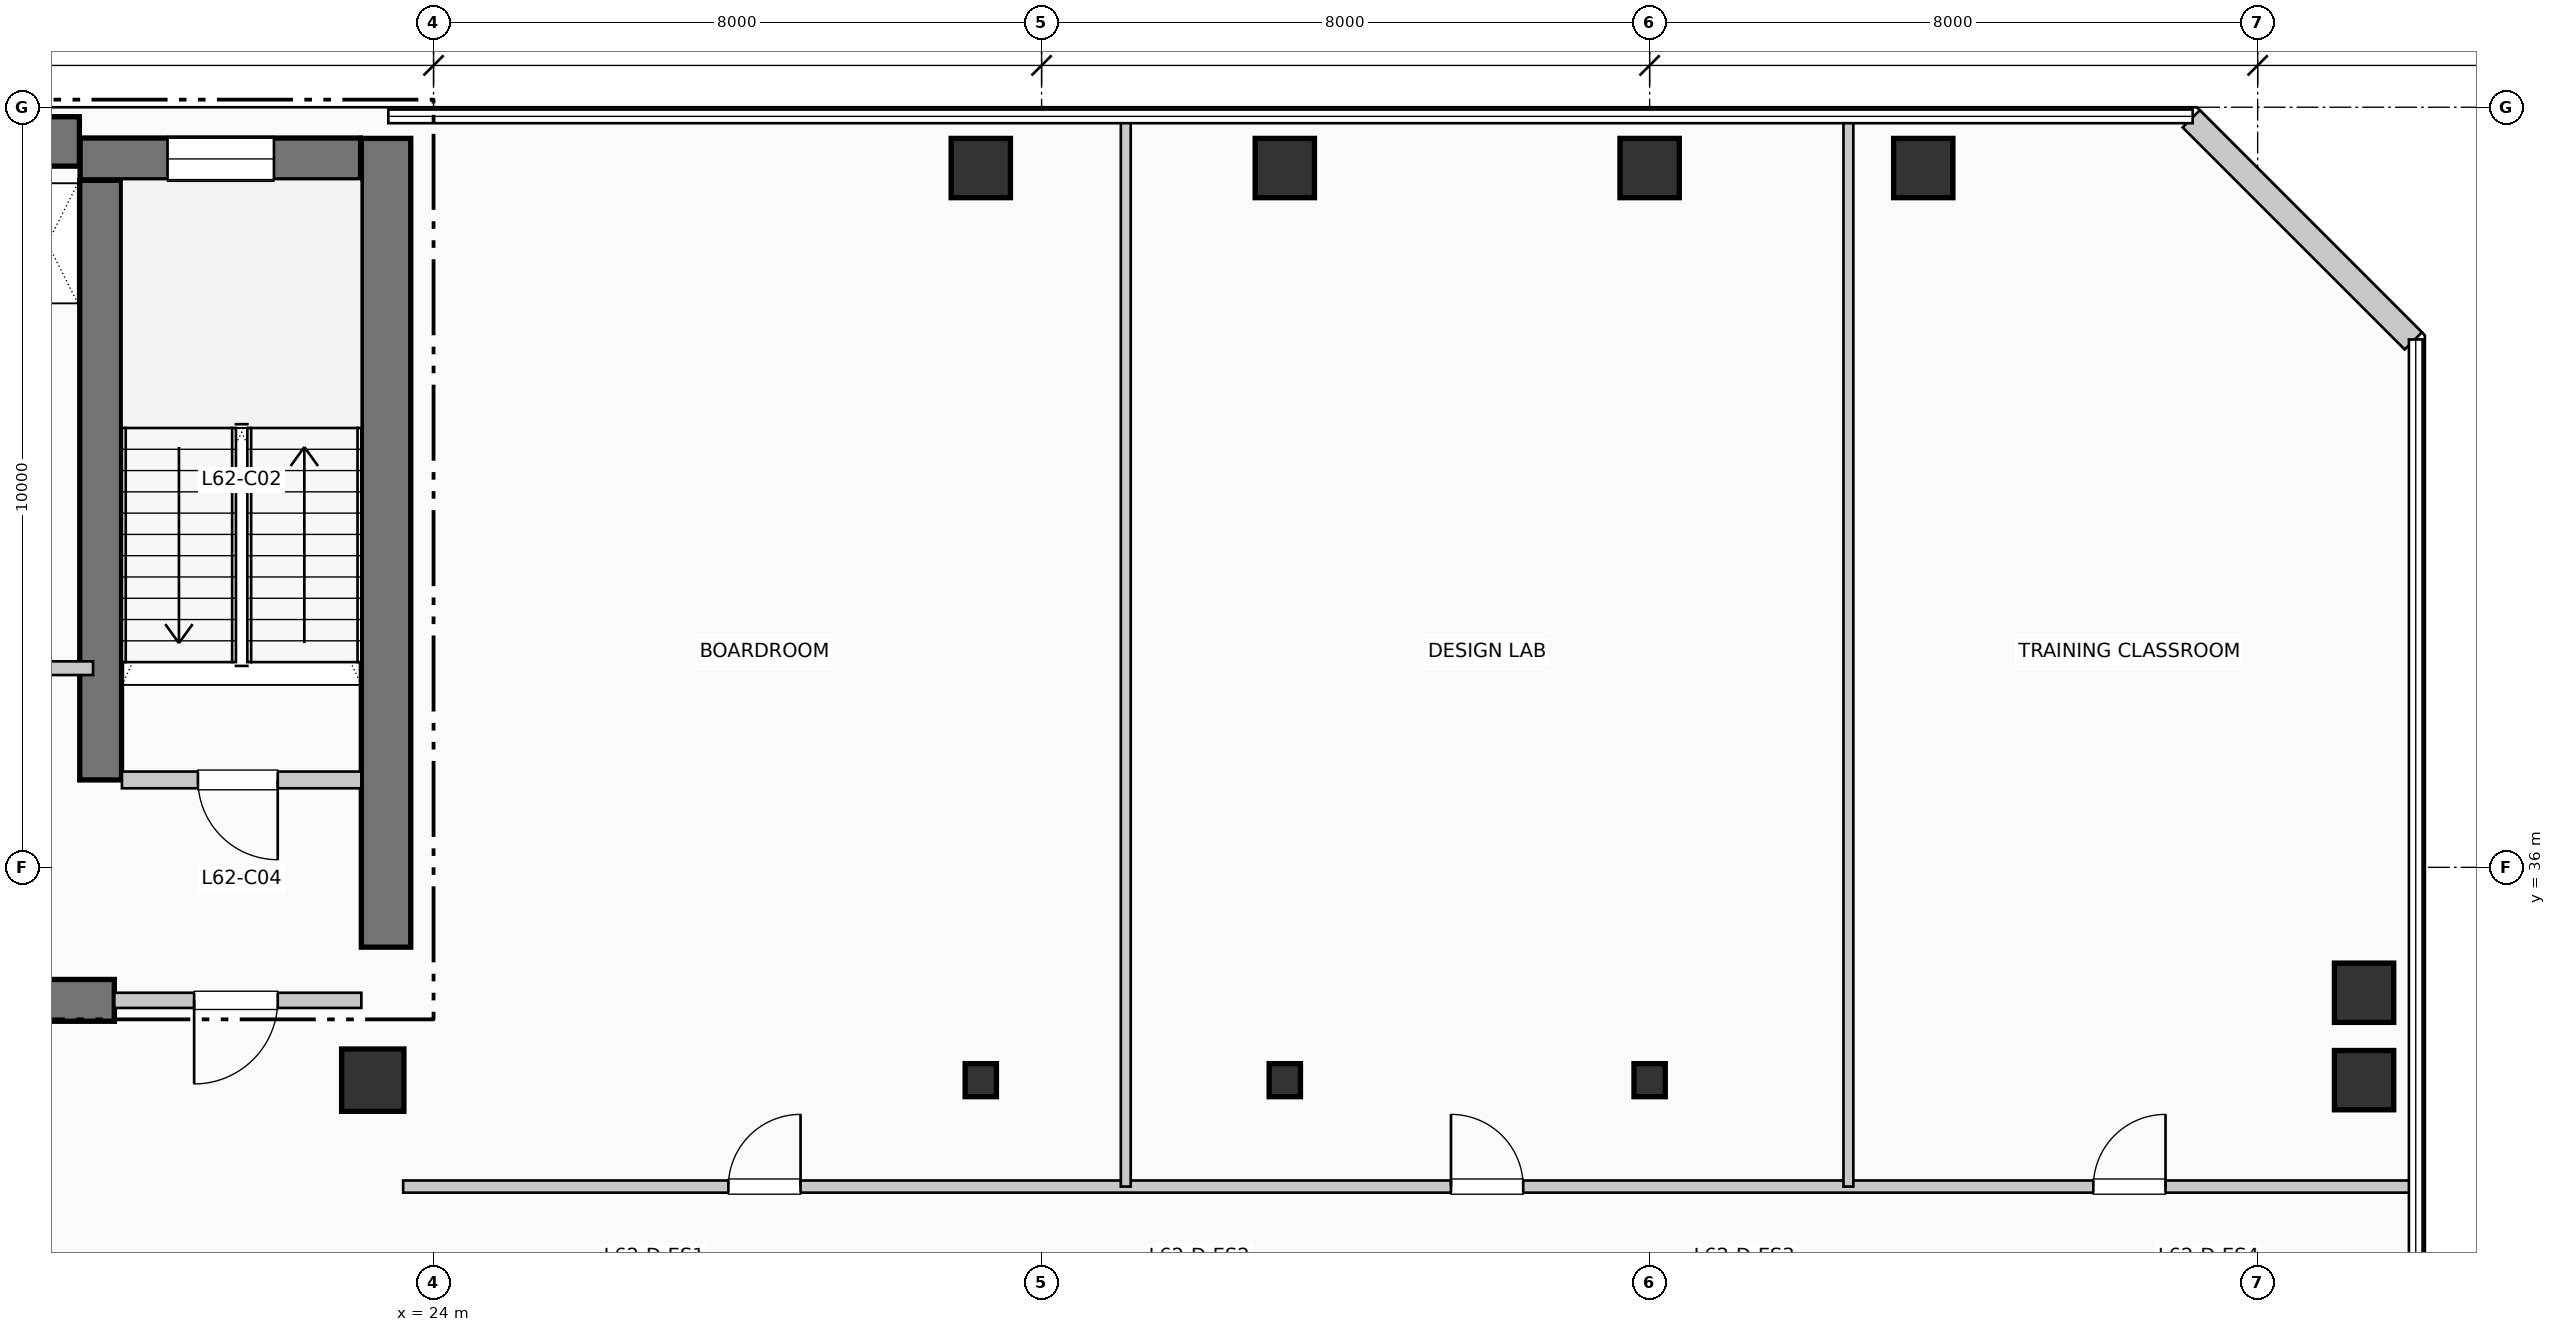
"""IFC4 building model, lengths in metres.
Left out: names, types, materials, properties, quantities, classifications, styles, units other than length and angle.
Written with IfcOpenShell. Run it as: python <this file> out.ifc"""

import sys

from ifc_helpers import new_model, si_unit, direction, frame, frame_2d, origin, origin_2d, place, context, subcontext, project, spatial, rectangle, i_section, extrude, element, fill, save


model = new_model("IFC4")
c1 = context("Model", 3, precision=1e-05, world=origin(), true_north=direction((0.0, 1.0)))
c2 = subcontext(c1, "Body", "Model", "MODEL_VIEW")
j1 = project(units=[si_unit("LENGTHUNIT", "METRE"), si_unit("PLANEANGLEUNIT", "RADIAN")], contexts=[c1])
p1 = place(None, origin())
s1 = spatial("IfcSite", under=j1, at=p1, CompositionType="ELEMENT")
p2 = place(p1, origin())
s2 = spatial("IfcBuilding", under=s1, at=p2, CompositionType="ELEMENT")
p3 = place(p2, frame((0.0, 0.0, 256.41)))
s3 = spatial("IfcBuildingStorey", under=s2, at=p3, CompositionType="ELEMENT", Elevation=256.41)
p4 = place(p3, frame((5.36, 45.55, 0.0), z_axis=(0.0, 0.0, 1.0), x_axis=(1.0, 0.0, 0.0)))
e1 = element("IfcWall", 1, at=p4, inside=s3, PredefinedType="SHEAR", context=c2, shape_type="SweptSolid", body=[
    extrude(rectangle(XDim=13.98, YDim=0.65, at=frame_2d((6.99, 0.0))), origin(), (0.0, 0.0, 1.0), 3.96),
])
p5 = place(p3, frame((23.375, 34.95, 0.0), z_axis=(0.0, 0.0, 1.0), x_axis=(0.0, 1.0, 0.0)))
e2 = element("IfcWall", 2, at=p5, inside=s3, PredefinedType="SHEAR", context=c2, shape_type="SweptSolid", body=[
    extrude(rectangle(XDim=10.64, YDim=0.65, at=frame_2d((5.32, 0.0))), origin(), (0.0, 0.0, 1.0), 3.96),
])
p6 = place(p3, frame((13.68, 34.25, 0.0), z_axis=(0.0, 0.0, 1.0), x_axis=(1.0, 0.0, 0.0)))
e3 = element("IfcWall", 3, at=p6, inside=s3, PredefinedType="SHEAR", context=c2, shape_type="SweptSolid", body=[
    extrude(rectangle(XDim=6.12, YDim=0.55, at=frame_2d((3.06, 0.0))), origin(), (0.0, 0.0, 1.0), 3.96),
])
p7 = place(p3, frame((19.62, 37.15, 0.0), z_axis=(0.0, 0.0, 1.0), x_axis=(0.0, 1.0, 0.0)))
e4 = element("IfcWall", 4, at=p7, inside=s3, PredefinedType="SHEAR", context=c2, shape_type="SweptSolid", body=[
    extrude(rectangle(XDim=7.89, YDim=0.55, at=frame_2d((3.945, 0.0))), origin(), (0.0, 0.0, 1.0), 3.96),
])
p8 = place(p3, frame((19.35, 45.32, 0.0), z_axis=(0.0, 0.0, 1.0), x_axis=(1.0, 0.0, 0.0)))
e5 = element("IfcWall", 5, at=p8, inside=s3, PredefinedType="SHEAR", context=c2, shape_type="SweptSolid", body=[
    extrude(rectangle(XDim=3.69, YDim=0.55, at=frame_2d((1.845, 0.0))), origin(), (0.0, 0.0, 1.0), 3.96),
])
p9 = place(p8, frame((1.15, 0.0, 1.05)))
e6 = element("IfcOpeningElement", 6, at=p9, cuts=e5, PredefinedType="OPENING", context=c2, shape_type="SweptSolid", body=[
    extrude(rectangle(XDim=1.4, YDim=1.8, at=frame_2d((0.7, 0.9))), frame((0.0, 0.285, 0.0), z_axis=(0.0, -1.0, 0.0), x_axis=(1.0, 0.0, 0.0)), (0.0, 0.0, 1.0), 0.57),
])
p10 = place(p3, frame((23.2, 33.2, 0.0), z_axis=(0.0, 0.0, 1.0), x_axis=(1.0, 0.0, 0.0)))
e7 = element("IfcColumn", 7, at=p10, inside=s3, PredefinedType="COLUMN", context=c2, shape_type="SweptSolid", body=[
    extrude(rectangle(XDim=0.82, YDim=0.82, at=origin_2d()), origin(), (0.0, 0.0, 1.0), 3.96),
])
p11 = place(p3, frame((31.2, 33.2, 0.0), z_axis=(0.0, 0.0, 1.0), x_axis=(1.0, 0.0, 0.0)))
e8 = element("IfcColumn", 8, at=p11, inside=s3, PredefinedType="COLUMN", context=c2, shape_type="SweptSolid", body=[
    extrude(i_section(OverallWidth=0.412, OverallDepth=0.435, WebThickness=0.027, FlangeThickness=0.043, at=origin_2d()), origin(), (0.0, 0.0, 1.0), 3.96),
])
p12 = place(p3, frame((31.2, 45.2, 0.0), z_axis=(0.0, 0.0, 1.0), x_axis=(1.0, 0.0, 0.0)))
e9 = element("IfcColumn", 9, at=p12, inside=s3, PredefinedType="COLUMN", context=c2, shape_type="SweptSolid", body=[
    extrude(rectangle(XDim=0.78, YDim=0.78, at=origin_2d()), origin(), (0.0, 0.0, 1.0), 3.96),
])
p13 = place(p3, frame((35.2, 33.2, 0.0), z_axis=(0.0, 0.0, 1.0), x_axis=(1.0, 0.0, 0.0)))
e10 = element("IfcColumn", 10, at=p13, inside=s3, PredefinedType="COLUMN", context=c2, shape_type="SweptSolid", body=[
    extrude(i_section(OverallWidth=0.412, OverallDepth=0.435, WebThickness=0.027, FlangeThickness=0.043, at=origin_2d()), origin(), (0.0, 0.0, 1.0), 3.96),
])
p14 = place(p3, frame((35.2, 45.2, 0.0), z_axis=(0.0, 0.0, 1.0), x_axis=(1.0, 0.0, 0.0)))
e11 = element("IfcColumn", 11, at=p14, inside=s3, PredefinedType="COLUMN", context=c2, shape_type="SweptSolid", body=[
    extrude(rectangle(XDim=0.78, YDim=0.78, at=origin_2d()), origin(), (0.0, 0.0, 1.0), 3.96),
])
p15 = place(p3, frame((40.0, 33.2, 0.0), z_axis=(0.0, 0.0, 1.0), x_axis=(1.0, 0.0, 0.0)))
e12 = element("IfcColumn", 12, at=p15, inside=s3, PredefinedType="COLUMN", context=c2, shape_type="SweptSolid", body=[
    extrude(i_section(OverallWidth=0.412, OverallDepth=0.435, WebThickness=0.027, FlangeThickness=0.043, at=origin_2d()), origin(), (0.0, 0.0, 1.0), 3.96),
])
for number, where, z_axis, x_axis in (
    (13, (40.0, 45.2, 0.0), (0.0, 0.0, 1.0), (1.0, 0.0, 0.0)),
    (14, (43.6, 45.2, 0.0), (0.0, 0.0, 1.0), (1.0, 0.0, 0.0)),
    (15, (49.4, 33.2, 0.0), (0.0, 0.0, 1.0), (1.0, 0.0, 0.0)),
    (16, (49.4, 34.35, 0.0), (0.0, 0.0, 1.0), (1.0, 0.0, 0.0)),
):
    element("IfcColumn", number, at=place(p3, frame(where, z_axis=z_axis, x_axis=x_axis)), inside=s3, PredefinedType="COLUMN", context=c2, shape_type="SweptSolid", body=[
        extrude(rectangle(XDim=0.78, YDim=0.78, at=origin_2d()), origin(), (0.0, 0.0, 1.0), 3.96),
    ])
p16 = place(p3, frame((50.048, 42.926, 0.0), z_axis=(0.0, 0.0, 1.0), x_axis=(-0.707136318428, 0.707077242712, 0.0)))
e17 = element("IfcWall", 17, at=p16, inside=s3, PredefinedType="SOLIDWALL", context=c2, shape_type="SweptSolid", body=[
    extrude(rectangle(XDim=4.133, YDim=0.32, at=frame_2d((2.066, 0.0))), origin(), (0.0, 0.0, 1.0), 3.71),
])
p17 = place(p3, frame((19.9, 37.15, 0.0), z_axis=(0.0, 0.0, 1.0), x_axis=(1.0, 0.0, 0.0)))
e18 = element("IfcWall", 18, at=p17, inside=s3, PredefinedType="PARTITIONING", context=c2, shape_type="SweptSolid", body=[
    extrude(rectangle(XDim=3.15, YDim=0.22, at=frame_2d((1.575, 0.0))), origin(), (0.0, 0.0, 1.0), 3.71),
])
p18 = place(p17, frame((2.05, 0.0, 0.0), z_axis=(0.0, 0.0, 1.0), x_axis=(-1.0, 0.0, 0.0)))
e19 = element("IfcOpeningElement", 19, at=p18, cuts=e18, PredefinedType="OPENING", context=c2, shape_type="SweptSolid", body=[
    extrude(rectangle(XDim=1.05, YDim=2.15, at=frame_2d((0.525, 1.075))), frame((0.0, 0.12, 0.0), z_axis=(0.0, -1.0, 0.0), x_axis=(1.0, 0.0, 0.0)), (0.0, 0.0, 1.0), 0.24),
])
p19 = place(p3, frame((19.8, 34.25, 0.0), z_axis=(0.0, 0.0, 1.0), x_axis=(1.0, 0.0, 0.0)))
e20 = element("IfcWall", 20, at=p19, inside=s3, PredefinedType="PARTITIONING", context=c2, shape_type="SweptSolid", body=[
    extrude(rectangle(XDim=3.25, YDim=0.2, at=frame_2d((1.625, 0.0))), origin(), (0.0, 0.0, 1.0), 3.71),
])
p20 = place(p19, frame((2.15, 0.0, 0.0), z_axis=(0.0, 0.0, 1.0), x_axis=(-1.0, 0.0, 0.0)))
e21 = element("IfcOpeningElement", 21, at=p20, cuts=e20, PredefinedType="OPENING", context=c2, shape_type="SweptSolid", body=[
    extrude(rectangle(XDim=1.1, YDim=2.15, at=frame_2d((0.55, 1.075))), frame((0.0, 0.11, 0.0), z_axis=(0.0, -1.0, 0.0), x_axis=(1.0, 0.0, 0.0)), (0.0, 0.0, 1.0), 0.22),
])
p21 = place(p3, frame((17.68, 38.62, 0.0), z_axis=(0.0, 0.0, 1.0), x_axis=(1.0, 0.0, 0.0)))
e22 = element("IfcWall", 22, at=p21, inside=s3, PredefinedType="PARTITIONING", context=c2, shape_type="SweptSolid", body=[
    extrude(rectangle(XDim=1.84, YDim=0.18, at=frame_2d((0.92, 0.0))), origin(), (0.0, 0.0, 1.0), 3.71),
])
p22 = place(p21, frame((0.24, 0.0, 0.0)))
e23 = element("IfcOpeningElement", 23, at=p22, cuts=e22, PredefinedType="OPENING", context=c2, shape_type="SweptSolid", body=[
    extrude(rectangle(XDim=0.92, YDim=2.1, at=frame_2d((0.46, 1.05))), frame((0.0, 0.1, 0.0), z_axis=(0.0, -1.0, 0.0), x_axis=(1.0, 0.0, 0.0)), (0.0, 0.0, 1.0), 0.2),
])
p23 = place(p3, frame((23.6, 31.8, 0.0), z_axis=(0.0, 0.0, 1.0), x_axis=(1.0, 0.0, 0.0)))
e24 = element("IfcWall", 24, at=p23, inside=s3, PredefinedType="PARTITIONING", context=c2, shape_type="SweptSolid", body=[
    extrude(rectangle(XDim=26.41, YDim=0.16, at=frame_2d((13.205, 0.0))), origin(), (0.0, 0.0, 1.0), 3.71),
])
p24 = place(p23, frame((4.279, 0.0, 0.0)))
e25 = element("IfcOpeningElement", 25, at=p24, cuts=e24, PredefinedType="OPENING", context=c2, shape_type="SweptSolid", body=[
    extrude(rectangle(XDim=0.95, YDim=2.15, at=frame_2d((0.475, 1.075))), frame((0.0, 0.09, 0.0), z_axis=(0.0, -1.0, 0.0), x_axis=(1.0, 0.0, 0.0)), (0.0, 0.0, 1.0), 0.18),
])
p25 = place(p23, frame((13.786, 0.0, 0.0)))
e26 = element("IfcOpeningElement", 26, at=p25, cuts=e24, PredefinedType="OPENING", context=c2, shape_type="SweptSolid", body=[
    extrude(rectangle(XDim=0.95, YDim=2.15, at=frame_2d((0.475, 1.075))), frame((0.0, 0.09, 0.0), z_axis=(0.0, -1.0, 0.0), x_axis=(1.0, 0.0, 0.0)), (0.0, 0.0, 1.0), 0.18),
])
p26 = place(p23, frame((22.238, 0.0, 0.0)))
e27 = element("IfcOpeningElement", 27, at=p26, cuts=e24, PredefinedType="OPENING", context=c2, shape_type="SweptSolid", body=[
    extrude(rectangle(XDim=0.95, YDim=2.15, at=frame_2d((0.475, 1.075))), frame((0.0, 0.09, 0.0), z_axis=(0.0, -1.0, 0.0), x_axis=(1.0, 0.0, 0.0)), (0.0, 0.0, 1.0), 0.18),
])
for number, where, z_axis, x_axis in (
    (28, (33.108, 31.8, 0.0), (0.0, 0.0, 1.0), (0.0, 1.0, 0.0)),
    (29, (42.615, 31.8, 0.0), (0.0, 0.0, 1.0), (0.0, 1.0, 0.0)),
):
    element("IfcWall", number, at=place(p3, frame(where, z_axis=z_axis, x_axis=x_axis)), inside=s3, PredefinedType="PARTITIONING", context=c2, shape_type="SweptSolid", body=[
        extrude(rectangle(XDim=14.01, YDim=0.13, at=frame_2d((7.005, 0.0))), origin(), (0.0, 0.0, 1.0), 3.71),
    ])
p27 = place(p9, origin())
e30 = element("IfcWindow", 30, at=p27, inside=s3, PartitioningType="SINGLE_PANEL", PredefinedType="WINDOW", context=c2, shape_type="SweptSolid", body=[
    extrude(rectangle(XDim=1.4, YDim=1.8, at=frame_2d((0.7, 0.9))), frame((0.0, 0.03, 0.0), z_axis=(0.0, -1.0, 0.0), x_axis=(1.0, 0.0, 0.0)), (0.0, 0.0, 1.0), 0.06),
])
fill(e6, e30)
p28 = place(p18, origin())
e31 = element("IfcDoor", 31, at=p28, inside=s3, OperationType="SINGLE_SWING_RIGHT", PredefinedType="DOOR", context=c2, shape_type="SweptSolid", body=[
    extrude(rectangle(XDim=1.05, YDim=2.15, at=frame_2d((0.525, 1.075))), frame((0.0, 0.025, 0.0), z_axis=(0.0, -1.0, 0.0), x_axis=(1.0, 0.0, 0.0)), (0.0, 0.0, 1.0), 0.05),
])
fill(e19, e31)
p29 = place(p20, origin())
e32 = element("IfcDoor", 32, at=p29, inside=s3, OperationType="SINGLE_SWING_LEFT", PredefinedType="DOOR", context=c2, shape_type="SweptSolid", body=[
    extrude(rectangle(XDim=1.1, YDim=2.15, at=frame_2d((0.55, 1.075))), frame((0.0, 0.025, 0.0), z_axis=(0.0, -1.0, 0.0), x_axis=(1.0, 0.0, 0.0)), (0.0, 0.0, 1.0), 0.05),
])
fill(e21, e32)
p30 = place(p24, origin())
e33 = element("IfcDoor", 33, at=p30, inside=s3, OperationType="SINGLE_SWING_RIGHT", PredefinedType="DOOR", context=c2, shape_type="SweptSolid", body=[
    extrude(rectangle(XDim=0.95, YDim=2.15, at=frame_2d((0.475, 1.075))), frame((0.0, 0.025, 0.0), z_axis=(0.0, -1.0, 0.0), x_axis=(1.0, 0.0, 0.0)), (0.0, 0.0, 1.0), 0.05),
])
fill(e25, e33)
p31 = place(p25, origin())
e34 = element("IfcDoor", 34, at=p31, inside=s3, OperationType="SINGLE_SWING_LEFT", PredefinedType="DOOR", context=c2, shape_type="SweptSolid", body=[
    extrude(rectangle(XDim=0.95, YDim=2.15, at=frame_2d((0.475, 1.075))), frame((0.0, 0.025, 0.0), z_axis=(0.0, -1.0, 0.0), x_axis=(1.0, 0.0, 0.0)), (0.0, 0.0, 1.0), 0.05),
])
fill(e26, e34)
p32 = place(p26, origin())
e35 = element("IfcDoor", 35, at=p32, inside=s3, OperationType="SINGLE_SWING_RIGHT", PredefinedType="DOOR", context=c2, shape_type="SweptSolid", body=[
    extrude(rectangle(XDim=0.95, YDim=2.15, at=frame_2d((0.475, 1.075))), frame((0.0, 0.025, 0.0), z_axis=(0.0, -1.0, 0.0), x_axis=(1.0, 0.0, 0.0)), (0.0, 0.0, 1.0), 0.05),
])
fill(e27, e35)
save(model, sys.argv[1])
